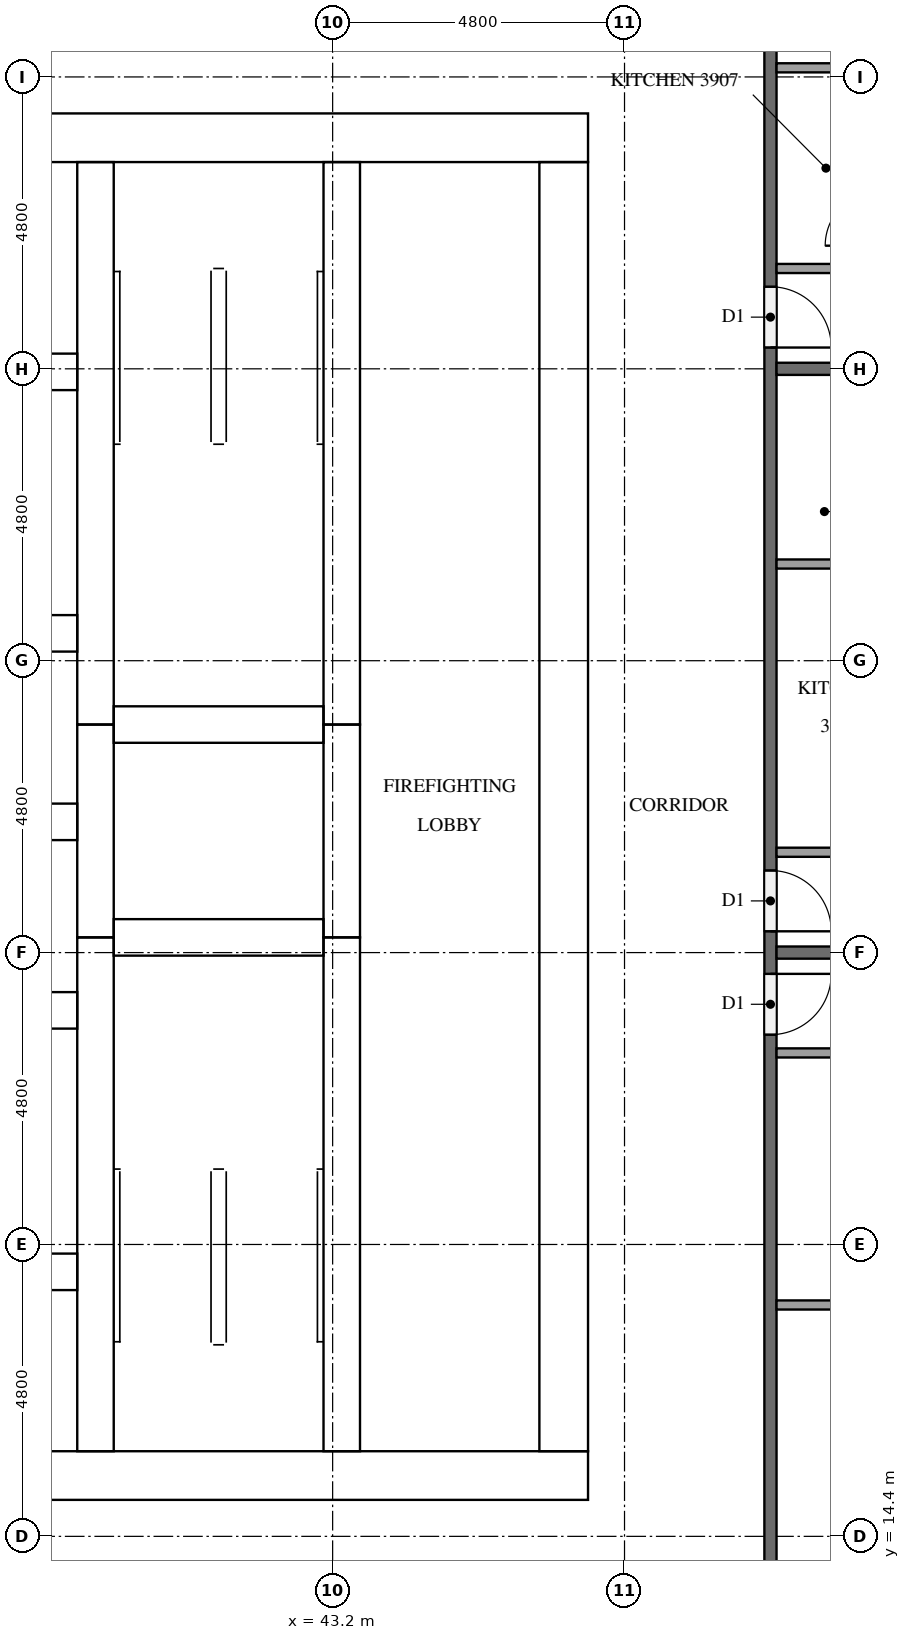
"""IFC4 building model, lengths in metres.
Left out: names, types, materials, properties, quantities, classifications, styles, units other than length and angle.
Written with IfcOpenShell. Run it as: python <this file> out.ifc"""

import sys

from ifc_helpers import new_model, si_unit, direction, frame, frame_2d, origin, place, context, subcontext, project, spatial, rectangle, extrude, element, fill, save


model = new_model("IFC4")
c1 = context("Model", 3, precision=1e-05, world=origin(), true_north=direction((0.0, 1.0)))
c2 = subcontext(c1, "Body", "Model", "MODEL_VIEW")
j1 = project(units=[si_unit("LENGTHUNIT", "METRE"), si_unit("PLANEANGLEUNIT", "RADIAN")], contexts=[c1])
p1 = place(None, origin())
s1 = spatial("IfcSite", under=j1, at=p1, CompositionType="ELEMENT")
p2 = place(p1, origin())
s2 = spatial("IfcBuilding", under=s1, at=p2, CompositionType="ELEMENT")
p3 = place(p2, frame((0.0, 0.0, 152.5)))
s3 = spatial("IfcBuildingStorey", under=s2, at=p3, CompositionType="ELEMENT", Elevation=152.5)
p4 = place(p3, frame((15.0, 15.4, 0.0), z_axis=(0.0, 0.0, 1.0), x_axis=(1.0, 0.0, 0.0)))
e1 = element("IfcWall", 1, at=p4, inside=s3, PredefinedType="SHEAR", context=c2, shape_type="SweptSolid", body=[
    extrude(rectangle(XDim=32.4, YDim=0.8, at=frame_2d((16.2, 0.0))), origin(), (0.0, 0.0, 1.0), 3.2),
])
p5 = place(p4, frame((15.3, 0.0, 0.0)))
e2 = element("IfcOpeningElement", 2, at=p5, cuts=e1, PredefinedType="OPENING", context=c2, shape_type="SweptSolid", body=[
    extrude(rectangle(XDim=1.8, YDim=2.1, at=frame_2d((0.9, 1.05))), frame((0.0, 0.41, 0.0), z_axis=(0.0, -1.0, 0.0), x_axis=(1.0, 0.0, 0.0)), (0.0, 0.0, 1.0), 0.82),
])
p6 = place(p3, frame((15.0, 37.4, 0.0), z_axis=(0.0, 0.0, 1.0), x_axis=(1.0, 0.0, 0.0)))
e3 = element("IfcWall", 3, at=p6, inside=s3, PredefinedType="SHEAR", context=c2, shape_type="SweptSolid", body=[
    extrude(rectangle(XDim=32.4, YDim=0.8, at=frame_2d((16.2, 0.0))), origin(), (0.0, 0.0, 1.0), 3.2),
])
p7 = place(p6, frame((15.3, 0.0, 0.0)))
e4 = element("IfcOpeningElement", 4, at=p7, cuts=e3, PredefinedType="OPENING", context=c2, shape_type="SweptSolid", body=[
    extrude(rectangle(XDim=1.8, YDim=2.1, at=frame_2d((0.9, 1.05))), frame((0.0, 0.41, 0.0), z_axis=(0.0, -1.0, 0.0), x_axis=(1.0, 0.0, 0.0)), (0.0, 0.0, 1.0), 0.82),
])
p8 = place(p6, frame((1.51, 0.0, 0.0)))
e5 = element("IfcOpeningElement", 5, at=p8, cuts=e3, PredefinedType="OPENING", context=c2, shape_type="SweptSolid", body=[
    extrude(rectangle(XDim=1.0, YDim=2.1, at=frame_2d((0.5, 1.05))), frame((0.0, 0.41, 0.0), z_axis=(0.0, -1.0, 0.0), x_axis=(1.0, 0.0, 0.0)), (0.0, 0.0, 1.0), 0.82),
])
p9 = place(p6, frame((5.11, 0.0, 0.0)))
e6 = element("IfcOpeningElement", 6, at=p9, cuts=e3, PredefinedType="OPENING", context=c2, shape_type="SweptSolid", body=[
    extrude(rectangle(XDim=1.0, YDim=2.1, at=frame_2d((0.5, 1.05))), frame((0.0, 0.41, 0.0), z_axis=(0.0, -1.0, 0.0), x_axis=(1.0, 0.0, 0.0)), (0.0, 0.0, 1.0), 0.82),
])
p10 = place(p3, frame((47.0, 15.8, 0.0), z_axis=(0.0, 0.0, 1.0), x_axis=(0.0, 1.0, 0.0)))
e7 = element("IfcWall", 7, at=p10, inside=s3, PredefinedType="SHEAR", context=c2, shape_type="SweptSolid", body=[
    extrude(rectangle(XDim=21.2, YDim=0.8, at=frame_2d((10.6, 0.0))), origin(), (0.0, 0.0, 1.0), 3.2),
])
p11 = place(p10, frame((10.3, 0.0, 0.0)))
e8 = element("IfcOpeningElement", 8, at=p11, cuts=e7, PredefinedType="OPENING", context=c2, shape_type="SweptSolid", body=[
    extrude(rectangle(XDim=1.2, YDim=2.1, at=frame_2d((0.6, 1.05))), frame((0.0, 0.41, 0.0), z_axis=(0.0, -1.0, 0.0), x_axis=(1.0, 0.0, 0.0)), (0.0, 0.0, 1.0), 0.82),
])
p12 = place(p3, frame((39.3, 15.8, 0.0), z_axis=(0.0, 0.0, 1.0), x_axis=(0.0, 1.0, 0.0)))
e9 = element("IfcWall", 9, at=p12, inside=s3, PredefinedType="SHEAR", context=c2, shape_type="SweptSolid", body=[
    extrude(rectangle(XDim=8.45, YDim=0.6, at=frame_2d((4.225, 0.0))), origin(), (0.0, 0.0, 1.0), 3.2),
])
p13 = place(p3, frame((39.3, 24.25, 0.0), z_axis=(0.0, 0.0, 1.0), x_axis=(0.0, 1.0, 0.0)))
e10 = element("IfcWall", 10, at=p13, inside=s3, PredefinedType="SHEAR", context=c2, shape_type="SweptSolid", body=[
    extrude(rectangle(XDim=3.5, YDim=0.6, at=frame_2d((1.75, 0.0))), origin(), (0.0, 0.0, 1.0), 3.2),
])
p14 = place(p3, frame((39.3, 27.75, 0.0), z_axis=(0.0, 0.0, 1.0), x_axis=(0.0, 1.0, 0.0)))
e11 = element("IfcWall", 11, at=p14, inside=s3, PredefinedType="SHEAR", context=c2, shape_type="SweptSolid", body=[
    extrude(rectangle(XDim=9.25, YDim=0.6, at=frame_2d((4.625, 0.0))), origin(), (0.0, 0.0, 1.0), 3.2),
])
p15 = place(p3, frame((43.35, 15.8, 0.0), z_axis=(0.0, 0.0, 1.0), x_axis=(0.0, 1.0, 0.0)))
e12 = element("IfcWall", 12, at=p15, inside=s3, PredefinedType="SHEAR", context=c2, shape_type="SweptSolid", body=[
    extrude(rectangle(XDim=8.45, YDim=0.6, at=frame_2d((4.225, 0.0))), origin(), (0.0, 0.0, 1.0), 3.2),
])
p16 = place(p15, frame((0.4, 0.0, 0.0)))
e13 = element("IfcOpeningElement", 13, at=p16, cuts=e12, PredefinedType="OPENING", context=c2, shape_type="SweptSolid", body=[
    extrude(rectangle(XDim=1.2, YDim=2.1, at=frame_2d((0.6, 1.05))), frame((0.0, 0.31, 0.0), z_axis=(0.0, -1.0, 0.0), x_axis=(1.0, 0.0, 0.0)), (0.0, 0.0, 1.0), 0.62),
])
p17 = place(p3, frame((43.35, 24.25, 0.0), z_axis=(0.0, 0.0, 1.0), x_axis=(0.0, 1.0, 0.0)))
e14 = element("IfcWall", 14, at=p17, inside=s3, PredefinedType="SHEAR", context=c2, shape_type="SweptSolid", body=[
    extrude(rectangle(XDim=3.5, YDim=0.6, at=frame_2d((1.75, 0.0))), origin(), (0.0, 0.0, 1.0), 3.2),
])
p18 = place(p17, frame((1.2, 0.0, 0.0)))
e15 = element("IfcOpeningElement", 15, at=p18, cuts=e14, PredefinedType="OPENING", context=c2, shape_type="SweptSolid", body=[
    extrude(rectangle(XDim=1.1, YDim=2.1, at=frame_2d((0.55, 1.05))), frame((0.0, 0.31, 0.0), z_axis=(0.0, -1.0, 0.0), x_axis=(1.0, 0.0, 0.0)), (0.0, 0.0, 1.0), 0.62),
])
p19 = place(p3, frame((43.35, 27.75, 0.0), z_axis=(0.0, 0.0, 1.0), x_axis=(0.0, 1.0, 0.0)))
e16 = element("IfcWall", 16, at=p19, inside=s3, PredefinedType="SHEAR", context=c2, shape_type="SweptSolid", body=[
    extrude(rectangle(XDim=9.25, YDim=0.6, at=frame_2d((4.625, 0.0))), origin(), (0.0, 0.0, 1.0), 3.2),
])
p20 = place(p19, frame((7.65, 0.0, 0.0)))
e17 = element("IfcOpeningElement", 17, at=p20, cuts=e16, PredefinedType="OPENING", context=c2, shape_type="SweptSolid", body=[
    extrude(rectangle(XDim=1.2, YDim=2.1, at=frame_2d((0.6, 1.05))), frame((0.0, 0.31, 0.0), z_axis=(0.0, -1.0, 0.0), x_axis=(1.0, 0.0, 0.0)), (0.0, 0.0, 1.0), 0.62),
])
for number, where, z_axis, x_axis in (
    (18, (39.6, 24.25, 0.0), (0.0, 0.0, 1.0), (1.0, 0.0, 0.0)),
    (19, (39.6, 27.75, 0.0), (0.0, 0.0, 1.0), (1.0, 0.0, 0.0)),
):
    element("IfcWall", number, at=place(p3, frame(where, z_axis=z_axis, x_axis=x_axis)), inside=s3, PredefinedType="SHEAR", context=c2, shape_type="SweptSolid", body=[
        extrude(rectangle(XDim=3.45, YDim=0.6, at=frame_2d((1.725, 0.0))), origin(), (0.0, 0.0, 1.0), 3.2),
    ])
p21 = place(p3, frame((33.4, 18.75, 0.0), z_axis=(0.0, 0.0, 1.0), x_axis=(1.0, 0.0, 0.0)))
e20 = element("IfcWall", 20, at=p21, inside=s3, PredefinedType="SHEAR", context=c2, shape_type="SweptSolid", body=[
    extrude(rectangle(XDim=5.6, YDim=0.6, at=frame_2d((2.8, 0.0))), origin(), (0.0, 0.0, 1.0), 3.2),
])
p22 = place(p21, frame((2.6, 0.0, 0.0)))
e21 = element("IfcOpeningElement", 21, at=p22, cuts=e20, PredefinedType="OPENING", context=c2, shape_type="SweptSolid", body=[
    extrude(rectangle(XDim=1.0, YDim=2.1, at=frame_2d((0.5, 1.05))), frame((0.0, 0.31, 0.0), z_axis=(0.0, -1.0, 0.0), x_axis=(1.0, 0.0, 0.0)), (0.0, 0.0, 1.0), 0.62),
])
p23 = place(p3, frame((23.4, 23.05, 0.0), z_axis=(0.0, 0.0, 1.0), x_axis=(1.0, 0.0, 0.0)))
e22 = element("IfcWall", 22, at=p23, inside=s3, PredefinedType="SHEAR", context=c2, shape_type="SweptSolid", body=[
    extrude(rectangle(XDim=15.6, YDim=0.6, at=frame_2d((7.8, 0.0))), origin(), (0.0, 0.0, 1.0), 3.2),
])
p24 = place(p23, frame((2.033, 0.0, 0.0)))
e23 = element("IfcOpeningElement", 23, at=p24, cuts=e22, PredefinedType="OPENING", context=c2, shape_type="SweptSolid", body=[
    extrude(rectangle(XDim=1.0, YDim=2.1, at=frame_2d((0.5, 1.05))), frame((0.0, 0.31, 0.0), z_axis=(0.0, -1.0, 0.0), x_axis=(1.0, 0.0, 0.0)), (0.0, 0.0, 1.0), 0.62),
])
p25 = place(p23, frame((12.567, 0.0, 0.0)))
e24 = element("IfcOpeningElement", 24, at=p25, cuts=e22, PredefinedType="OPENING", context=c2, shape_type="SweptSolid", body=[
    extrude(rectangle(XDim=1.0, YDim=2.1, at=frame_2d((0.5, 1.05))), frame((0.0, 0.31, 0.0), z_axis=(0.0, -1.0, 0.0), x_axis=(1.0, 0.0, 0.0)), (0.0, 0.0, 1.0), 0.62),
])
p26 = place(p3, frame((23.4, 26.15, 0.0), z_axis=(0.0, 0.0, 1.0), x_axis=(1.0, 0.0, 0.0)))
e25 = element("IfcWall", 25, at=p26, inside=s3, PredefinedType="SHEAR", context=c2, shape_type="SweptSolid", body=[
    extrude(rectangle(XDim=15.6, YDim=0.6, at=frame_2d((7.8, 0.0))), origin(), (0.0, 0.0, 1.0), 3.2),
])
p27 = place(p3, frame((23.4, 29.25, 0.0), z_axis=(0.0, 0.0, 1.0), x_axis=(1.0, 0.0, 0.0)))
e26 = element("IfcWall", 26, at=p27, inside=s3, PredefinedType="SHEAR", context=c2, shape_type="SweptSolid", body=[
    extrude(rectangle(XDim=15.6, YDim=0.6, at=frame_2d((7.8, 0.0))), origin(), (0.0, 0.0, 1.0), 3.2),
])
p28 = place(p27, frame((0.667, 0.0, 0.0)))
e27 = element("IfcOpeningElement", 27, at=p28, cuts=e26, PredefinedType="OPENING", context=c2, shape_type="SweptSolid", body=[
    extrude(rectangle(XDim=1.1, YDim=2.1, at=frame_2d((0.55, 1.05))), frame((0.0, 0.31, 0.0), z_axis=(0.0, -1.0, 0.0), x_axis=(1.0, 0.0, 0.0)), (0.0, 0.0, 1.0), 0.62),
])
p29 = place(p27, frame((3.3, 0.0, 0.0)))
e28 = element("IfcOpeningElement", 28, at=p29, cuts=e26, PredefinedType="OPENING", context=c2, shape_type="SweptSolid", body=[
    extrude(rectangle(XDim=1.1, YDim=2.1, at=frame_2d((0.55, 1.05))), frame((0.0, 0.31, 0.0), z_axis=(0.0, -1.0, 0.0), x_axis=(1.0, 0.0, 0.0)), (0.0, 0.0, 1.0), 0.62),
])
p30 = place(p27, frame((5.933, 0.0, 0.0)))
e29 = element("IfcOpeningElement", 29, at=p30, cuts=e26, PredefinedType="OPENING", context=c2, shape_type="SweptSolid", body=[
    extrude(rectangle(XDim=1.1, YDim=2.1, at=frame_2d((0.55, 1.05))), frame((0.0, 0.31, 0.0), z_axis=(0.0, -1.0, 0.0), x_axis=(1.0, 0.0, 0.0)), (0.0, 0.0, 1.0), 0.62),
])
p31 = place(p27, frame((8.567, 0.0, 0.0)))
e30 = element("IfcOpeningElement", 30, at=p31, cuts=e26, PredefinedType="OPENING", context=c2, shape_type="SweptSolid", body=[
    extrude(rectangle(XDim=1.1, YDim=2.1, at=frame_2d((0.55, 1.05))), frame((0.0, 0.31, 0.0), z_axis=(0.0, -1.0, 0.0), x_axis=(1.0, 0.0, 0.0)), (0.0, 0.0, 1.0), 0.62),
])
p32 = place(p27, frame((11.2, 0.0, 0.0)))
e31 = element("IfcOpeningElement", 31, at=p32, cuts=e26, PredefinedType="OPENING", context=c2, shape_type="SweptSolid", body=[
    extrude(rectangle(XDim=1.1, YDim=2.1, at=frame_2d((0.55, 1.05))), frame((0.0, 0.31, 0.0), z_axis=(0.0, -1.0, 0.0), x_axis=(1.0, 0.0, 0.0)), (0.0, 0.0, 1.0), 0.62),
])
p33 = place(p27, frame((13.833, 0.0, 0.0)))
e32 = element("IfcOpeningElement", 32, at=p33, cuts=e26, PredefinedType="OPENING", context=c2, shape_type="SweptSolid", body=[
    extrude(rectangle(XDim=1.1, YDim=2.1, at=frame_2d((0.55, 1.05))), frame((0.0, 0.31, 0.0), z_axis=(0.0, -1.0, 0.0), x_axis=(1.0, 0.0, 0.0)), (0.0, 0.0, 1.0), 0.62),
])
p34 = place(p3, frame((33.4, 33.55, 0.0), z_axis=(0.0, 0.0, 1.0), x_axis=(1.0, 0.0, 0.0)))
e33 = element("IfcWall", 33, at=p34, inside=s3, PredefinedType="SHEAR", context=c2, shape_type="SweptSolid", body=[
    extrude(rectangle(XDim=5.6, YDim=0.6, at=frame_2d((2.8, 0.0))), origin(), (0.0, 0.0, 1.0), 3.2),
])
p35 = place(p34, frame((2.6, 0.0, 0.0)))
e34 = element("IfcOpeningElement", 34, at=p35, cuts=e33, PredefinedType="OPENING", context=c2, shape_type="SweptSolid", body=[
    extrude(rectangle(XDim=1.0, YDim=2.1, at=frame_2d((0.5, 1.05))), frame((0.0, 0.31, 0.0), z_axis=(0.0, -1.0, 0.0), x_axis=(1.0, 0.0, 0.0)), (0.0, 0.0, 1.0), 0.62),
])
p36 = place(p3, frame((50.4, 40.7, 0.0), z_axis=(0.0, 0.0, 1.0), x_axis=(0.0, -1.0, 0.0)))
e35 = element("IfcWall", 35, at=p36, inside=s3, PredefinedType="PARTITIONING", context=c2, shape_type="SweptSolid", body=[
    extrude(rectangle(XDim=28.6, YDim=0.2, at=frame_2d((14.3, 0.0))), origin(), (0.0, 0.0, 1.0), 3.2),
])
p37 = place(p36, frame((17.05, 0.0, 0.0)))
e36 = element("IfcOpeningElement", 36, at=p37, cuts=e35, PredefinedType="OPENING", context=c2, shape_type="SweptSolid", body=[
    extrude(rectangle(XDim=1.0, YDim=2.1, at=frame_2d((0.5, 1.05))), frame((0.0, 0.11, 0.0), z_axis=(0.0, -1.0, 0.0), x_axis=(1.0, 0.0, 0.0)), (0.0, 0.0, 1.0), 0.22),
])
p38 = place(p36, frame((15.35, 0.0, 0.0)))
e37 = element("IfcOpeningElement", 37, at=p38, cuts=e35, PredefinedType="OPENING", context=c2, shape_type="SweptSolid", body=[
    extrude(rectangle(XDim=1.0, YDim=2.1, at=frame_2d((0.5, 1.05))), frame((0.0, 0.11, 0.0), z_axis=(0.0, -1.0, 0.0), x_axis=(1.0, 0.0, 0.0)), (0.0, 0.0, 1.0), 0.22),
])
p39 = place(p36, frame((5.75, 0.0, 0.0)))
e38 = element("IfcOpeningElement", 38, at=p39, cuts=e35, PredefinedType="OPENING", context=c2, shape_type="SweptSolid", body=[
    extrude(rectangle(XDim=1.0, YDim=2.1, at=frame_2d((0.5, 1.05))), frame((0.0, 0.11, 0.0), z_axis=(0.0, -1.0, 0.0), x_axis=(1.0, 0.0, 0.0)), (0.0, 0.0, 1.0), 0.22),
])
for number, where, z_axis, x_axis in (
    (39, (50.5, 24.0, 0.0), (0.0, 0.0, 1.0), (1.0, 0.0, 0.0)),
    (40, (50.5, 33.6, 0.0), (0.0, 0.0, 1.0), (1.0, 0.0, 0.0)),
):
    element("IfcWall", number, at=place(p3, frame(where, z_axis=z_axis, x_axis=x_axis)), inside=s3, PredefinedType="PARTITIONING", context=c2, shape_type="SweptSolid", body=[
        extrude(rectangle(XDim=6.725, YDim=0.2, at=frame_2d((3.363, 0.0))), origin(), (0.0, 0.0, 1.0), 3.2),
    ])
p40 = place(p3, frame((50.5, 18.205, 0.0), z_axis=(0.0, 0.0, 1.0), x_axis=(1.0, 0.0, 0.0)))
e41 = element("IfcWall", 41, at=p40, inside=s3, PredefinedType="PARTITIONING", context=c2, shape_type="SweptSolid", body=[
    extrude(rectangle(XDim=1.925, YDim=0.15, at=frame_2d((0.962, 0.0))), origin(), (0.0, 0.0, 1.0), 3.2),
])
for number, where, z_axis, x_axis in (
    (42, (50.5, 22.35, 0.0), (0.0, 0.0, 1.0), (1.0, 0.0, 0.0)),
    (43, (50.5, 30.39, 0.0), (0.0, 0.0, 1.0), (1.0, 0.0, 0.0)),
):
    element("IfcWall", number, at=place(p3, frame(where, z_axis=z_axis, x_axis=x_axis)), inside=s3, PredefinedType="PARTITIONING", context=c2, shape_type="SweptSolid", body=[
        extrude(rectangle(XDim=2.075, YDim=0.15, at=frame_2d((1.038, 0.0))), origin(), (0.0, 0.0, 1.0), 3.2),
    ])
p41 = place(p3, frame((50.5, 25.65, 0.0), z_axis=(0.0, 0.0, 1.0), x_axis=(1.0, 0.0, 0.0)))
e44 = element("IfcWall", 44, at=p41, inside=s3, PredefinedType="PARTITIONING", context=c2, shape_type="SweptSolid", body=[
    extrude(rectangle(XDim=2.225, YDim=0.15, at=frame_2d((1.113, 0.0))), origin(), (0.0, 0.0, 1.0), 3.2),
])
p42 = place(p3, frame((50.5, 38.55, 0.0), z_axis=(0.0, 0.0, 1.0), x_axis=(1.0, 0.0, 0.0)))
e45 = element("IfcWall", 45, at=p42, inside=s3, PredefinedType="PARTITIONING", context=c2, shape_type="SweptSolid", body=[
    extrude(rectangle(XDim=1.625, YDim=0.15, at=frame_2d((0.812, 0.0))), origin(), (0.0, 0.0, 1.0), 3.2),
])
p43 = place(p3, frame((50.5, 35.25, 0.0), z_axis=(0.0, 0.0, 1.0), x_axis=(1.0, 0.0, 0.0)))
e46 = element("IfcWall", 46, at=p43, inside=s3, PredefinedType="PARTITIONING", context=c2, shape_type="SweptSolid", body=[
    extrude(rectangle(XDim=1.775, YDim=0.15, at=frame_2d((0.887, 0.0))), origin(), (0.0, 0.0, 1.0), 3.2),
])
p44 = place(p18, origin())
e47 = element("IfcDoor", 47, at=p44, inside=s3, OperationType="DOUBLE_DOOR_SLIDING", PredefinedType="DOOR", context=c2, shape_type="SweptSolid", body=[
    extrude(rectangle(XDim=1.1, YDim=2.1, at=frame_2d((0.55, 1.05))), frame((0.0, 0.025, 0.0), z_axis=(0.0, -1.0, 0.0), x_axis=(1.0, 0.0, 0.0)), (0.0, 0.0, 1.0), 0.05),
])
fill(e15, e47)
p45 = place(p16, origin())
e48 = element("IfcDoor", 48, at=p45, inside=s3, OperationType="SINGLE_SWING_RIGHT", PredefinedType="DOOR", context=c2, shape_type="SweptSolid", body=[
    extrude(rectangle(XDim=1.2, YDim=2.1, at=frame_2d((0.6, 1.05))), frame((0.0, 0.025, 0.0), z_axis=(0.0, -1.0, 0.0), x_axis=(1.0, 0.0, 0.0)), (0.0, 0.0, 1.0), 0.05),
])
fill(e13, e48)
p46 = place(p20, origin())
e49 = element("IfcDoor", 49, at=p46, inside=s3, OperationType="SINGLE_SWING_LEFT", PredefinedType="DOOR", context=c2, shape_type="SweptSolid", body=[
    extrude(rectangle(XDim=1.2, YDim=2.1, at=frame_2d((0.6, 1.05))), frame((0.0, 0.025, 0.0), z_axis=(0.0, -1.0, 0.0), x_axis=(1.0, 0.0, 0.0)), (0.0, 0.0, 1.0), 0.05),
])
fill(e17, e49)
p47 = place(p11, origin())
e50 = element("IfcDoor", 50, at=p47, inside=s3, OperationType="SINGLE_SWING_LEFT", PredefinedType="DOOR", context=c2, shape_type="SweptSolid", body=[
    extrude(rectangle(XDim=1.2, YDim=2.1, at=frame_2d((0.6, 1.05))), frame((0.0, 0.025, 0.0), z_axis=(0.0, -1.0, 0.0), x_axis=(1.0, 0.0, 0.0)), (0.0, 0.0, 1.0), 0.05),
])
fill(e8, e50)
p48 = place(p37, origin())
e51 = element("IfcDoor", 51, at=p48, inside=s3, OperationType="SINGLE_SWING_LEFT", PredefinedType="DOOR", context=c2, shape_type="SweptSolid", body=[
    extrude(rectangle(XDim=1.0, YDim=2.1, at=frame_2d((0.5, 1.05))), frame((0.0, 0.025, 0.0), z_axis=(0.0, -1.0, 0.0), x_axis=(1.0, 0.0, 0.0)), (0.0, 0.0, 1.0), 0.05),
])
fill(e36, e51)
p49 = place(p38, origin())
e52 = element("IfcDoor", 52, at=p49, inside=s3, OperationType="SINGLE_SWING_RIGHT", PredefinedType="DOOR", context=c2, shape_type="SweptSolid", body=[
    extrude(rectangle(XDim=1.0, YDim=2.1, at=frame_2d((0.5, 1.05))), frame((0.0, 0.025, 0.0), z_axis=(0.0, -1.0, 0.0), x_axis=(1.0, 0.0, 0.0)), (0.0, 0.0, 1.0), 0.05),
])
fill(e37, e52)
p50 = place(p39, origin())
e53 = element("IfcDoor", 53, at=p50, inside=s3, OperationType="SINGLE_SWING_RIGHT", PredefinedType="DOOR", context=c2, shape_type="SweptSolid", body=[
    extrude(rectangle(XDim=1.0, YDim=2.1, at=frame_2d((0.5, 1.05))), frame((0.0, 0.025, 0.0), z_axis=(0.0, -1.0, 0.0), x_axis=(1.0, 0.0, 0.0)), (0.0, 0.0, 1.0), 0.05),
])
fill(e38, e53)
save(model, sys.argv[1])
